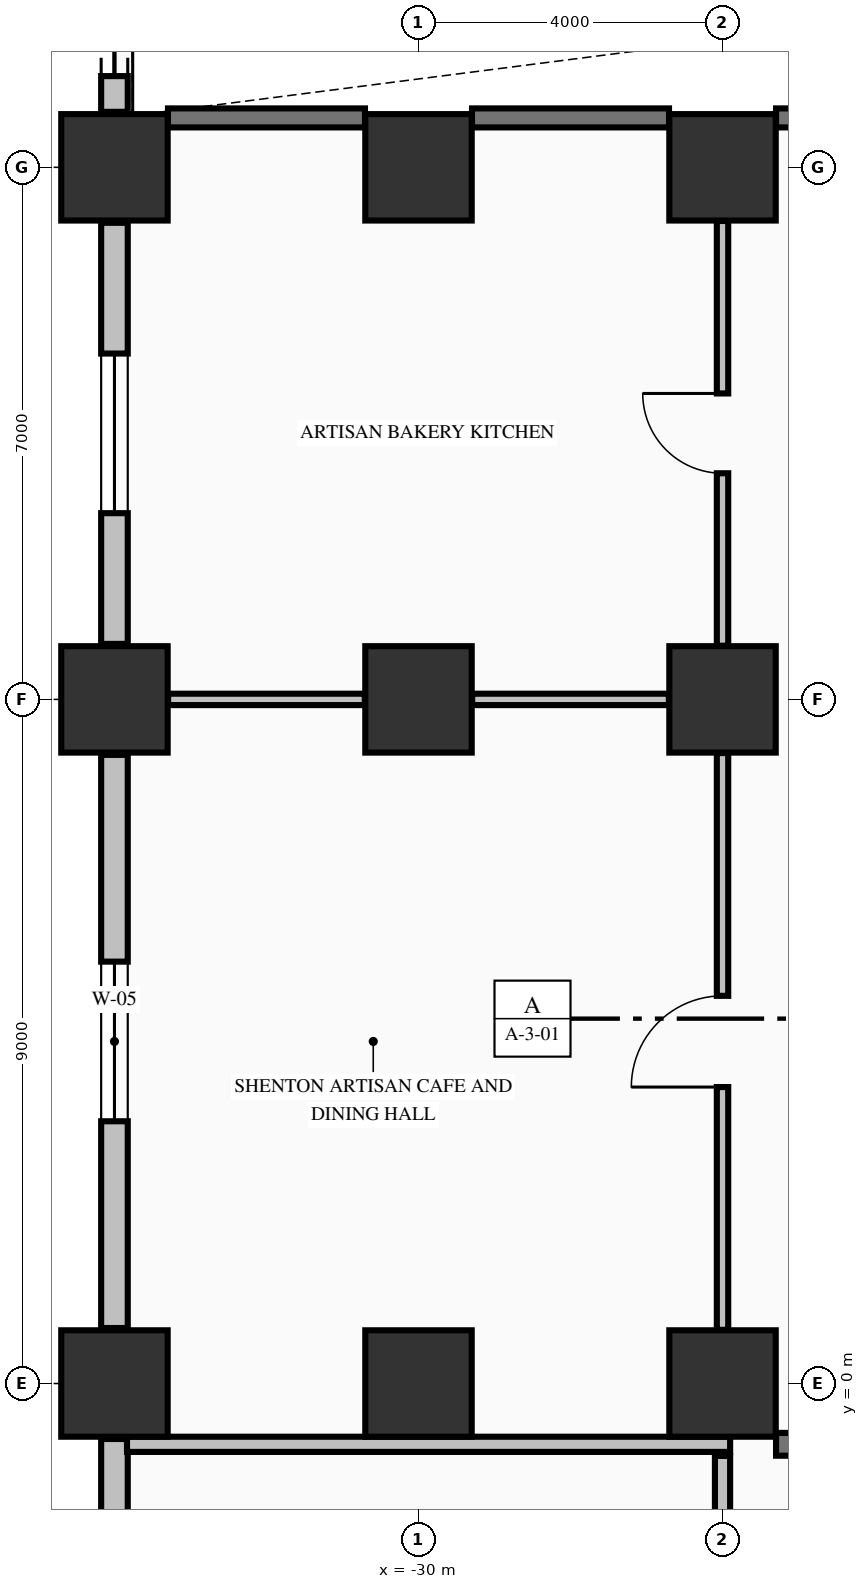
"""IFC4 building model, lengths in metres.
Left out: names, types, materials, properties, quantities, classifications, styles, units other than length and angle.
Written with IfcOpenShell. Run it as: python <this file> out.ifc"""

import sys

from ifc_helpers import new_model, si_unit, direction, frame, frame_2d, origin, origin_2d, place, context, subcontext, project, spatial, rectangle, extrude, element, fill, save


model = new_model("IFC4")
c1 = context("Model", 3, precision=1e-05, world=origin(), true_north=direction((0.0, 1.0)))
c2 = subcontext(c1, "Body", "Model", "MODEL_VIEW")
j1 = project(units=[si_unit("LENGTHUNIT", "METRE"), si_unit("PLANEANGLEUNIT", "RADIAN")], contexts=[c1])
p1 = place(None, origin())
s1 = spatial("IfcSite", under=j1, at=p1, CompositionType="ELEMENT")
p2 = place(p1, origin())
s2 = spatial("IfcBuilding", under=s1, at=p2, CompositionType="ELEMENT")
p3 = place(p2, origin())
s3 = spatial("IfcBuildingStorey", under=s2, at=p3, CompositionType="ELEMENT", Elevation=0.0)
for number, where, z_axis, x_axis in (
    (1, (-34.0, 0.0, 0.0), (0.0, 0.0, 1.0), (1.0, 0.0, 0.0)),
    (2, (-34.0, 9.0, 0.0), (0.0, 0.0, 1.0), (1.0, 0.0, 0.0)),
    (3, (-34.0, 16.0, 0.0), (0.0, 0.0, 1.0), (1.0, 0.0, 0.0)),
    (4, (-30.0, 0.0, 0.0), (0.0, 0.0, 1.0), (1.0, 0.0, 0.0)),
    (5, (-30.0, 9.0, 0.0), (0.0, 0.0, 1.0), (1.0, 0.0, 0.0)),
    (6, (-30.0, 16.0, 0.0), (0.0, 0.0, 1.0), (1.0, 0.0, 0.0)),
    (7, (-26.0, 0.0, 0.0), (0.0, 0.0, 1.0), (1.0, 0.0, 0.0)),
    (8, (-26.0, 9.0, 0.0), (0.0, 0.0, 1.0), (1.0, 0.0, 0.0)),
    (9, (-26.0, 16.0, 0.0), (0.0, 0.0, 1.0), (1.0, 0.0, 0.0)),
):
    element("IfcColumn", number, at=place(p3, frame(where, z_axis=z_axis, x_axis=x_axis)), inside=s3, PredefinedType="COLUMN", context=c2, shape_type="SweptSolid", body=[
        extrude(rectangle(XDim=1.4, YDim=1.4, at=origin_2d()), origin(), (0.0, 0.0, 1.0), 5.09),
    ])
p4 = place(p3, frame((-34.0, -8.27, 0.0), z_axis=(0.0, 0.0, 1.0), x_axis=(0.0, 1.0, 0.0)))
e10 = element("IfcWall", 10, at=p4, inside=s3, PredefinedType="STANDARD", context=c2, shape_type="SweptSolid", body=[
    extrude(rectangle(XDim=7.54, YDim=0.35, at=frame_2d((3.77, 0.0))), origin(), (0.0, 0.0, 1.0), 4.482),
])
p5 = place(p4, frame((2.72, 0.0, 0.75)))
e11 = element("IfcOpeningElement", 11, at=p5, cuts=e10, PredefinedType="OPENING", context=c2, shape_type="SweptSolid", body=[
    extrude(rectangle(XDim=2.1, YDim=1.75, at=frame_2d((1.05, 0.875))), frame((0.0, 0.185, 0.0), z_axis=(0.0, -1.0, 0.0), x_axis=(1.0, 0.0, 0.0)), (0.0, 0.0, 1.0), 0.37),
])
p6 = place(p3, frame((-34.0, 0.73, 0.0), z_axis=(0.0, 0.0, 1.0), x_axis=(0.0, 1.0, 0.0)))
e12 = element("IfcWall", 12, at=p6, inside=s3, PredefinedType="STANDARD", context=c2, shape_type="SweptSolid", body=[
    extrude(rectangle(XDim=7.54, YDim=0.35, at=frame_2d((3.77, 0.0))), origin(), (0.0, 0.0, 1.0), 4.482),
])
p7 = place(p6, frame((2.72, 0.0, 0.75)))
e13 = element("IfcOpeningElement", 13, at=p7, cuts=e12, PredefinedType="OPENING", context=c2, shape_type="SweptSolid", body=[
    extrude(rectangle(XDim=2.1, YDim=1.75, at=frame_2d((1.05, 0.875))), frame((0.0, 0.185, 0.0), z_axis=(0.0, -1.0, 0.0), x_axis=(1.0, 0.0, 0.0)), (0.0, 0.0, 1.0), 0.37),
])
p8 = place(p3, frame((-34.0, 9.73, 0.0), z_axis=(0.0, 0.0, 1.0), x_axis=(0.0, 1.0, 0.0)))
e14 = element("IfcWall", 14, at=p8, inside=s3, PredefinedType="STANDARD", context=c2, shape_type="SweptSolid", body=[
    extrude(rectangle(XDim=5.54, YDim=0.35, at=frame_2d((2.77, 0.0))), origin(), (0.0, 0.0, 1.0), 4.482),
])
p9 = place(p8, frame((1.72, 0.0, 0.75)))
e15 = element("IfcOpeningElement", 15, at=p9, cuts=e14, PredefinedType="OPENING", context=c2, shape_type="SweptSolid", body=[
    extrude(rectangle(XDim=2.1, YDim=1.75, at=frame_2d((1.05, 0.875))), frame((0.0, 0.185, 0.0), z_axis=(0.0, -1.0, 0.0), x_axis=(1.0, 0.0, 0.0)), (0.0, 0.0, 1.0), 0.37),
])
p10 = place(p3, frame((-34.0, 16.73, 0.0), z_axis=(0.0, 0.0, 1.0), x_axis=(0.0, 1.0, 0.0)))
e16 = element("IfcWall", 16, at=p10, inside=s3, PredefinedType="STANDARD", context=c2, shape_type="SweptSolid", body=[
    extrude(rectangle(XDim=4.54, YDim=0.35, at=frame_2d((2.27, 0.0))), origin(), (0.0, 0.0, 1.0), 4.482),
])
p11 = place(p10, frame((0.47, 0.0, 0.0)))
e17 = element("IfcOpeningElement", 17, at=p11, cuts=e16, PredefinedType="OPENING", context=c2, shape_type="SweptSolid", body=[
    extrude(rectangle(XDim=3.6, YDim=3.2, at=frame_2d((1.8, 1.6))), frame((0.0, 0.185, 0.0), z_axis=(0.0, -1.0, 0.0), x_axis=(1.0, 0.0, 0.0)), (0.0, 0.0, 1.0), 0.37),
])
p12 = place(p3, frame((-25.296, -0.8, 0.0), z_axis=(0.0, 0.0, 1.0), x_axis=(1.0, 0.0, 0.0)))
e18 = element("IfcWall", 18, at=p12, inside=s3, PredefinedType="SHEAR", context=c2, shape_type="SweptSolid", body=[
    extrude(rectangle(XDim=3.046, YDim=0.3, at=frame_2d((1.523, 0.0))), origin(), (0.0, 0.0, 1.0), 5.09),
])
for number, where, z_axis, x_axis in (
    (19, (-33.296, 16.65, 0.0), (0.0, 0.0, 1.0), (1.0, 0.0, 0.0)),
    (20, (-29.296, 16.65, 0.0), (0.0, 0.0, 1.0), (1.0, 0.0, 0.0)),
):
    element("IfcWall", number, at=place(p3, frame(where, z_axis=z_axis, x_axis=x_axis)), inside=s3, PredefinedType="SOLIDWALL", context=c2, shape_type="SweptSolid", body=[
        extrude(rectangle(XDim=2.592, YDim=0.25, at=frame_2d((1.296, 0.0))), origin(), (0.0, 0.0, 1.0), 5.09),
    ])
p13 = place(p3, frame((-25.296, 16.65, 0.0), z_axis=(0.0, 0.0, 1.0), x_axis=(1.0, 0.0, 0.0)))
e21 = element("IfcWall", 21, at=p13, inside=s3, PredefinedType="SOLIDWALL", context=c2, shape_type="SweptSolid", body=[
    extrude(rectangle(XDim=4.492, YDim=0.25, at=frame_2d((2.246, 0.0))), origin(), (0.0, 0.0, 1.0), 5.09),
])
p14 = place(p3, frame((-33.835, -0.8, 0.0), z_axis=(0.0, 0.0, 1.0), x_axis=(1.0, 0.0, 0.0)))
e22 = element("IfcWall", 22, at=p14, inside=s3, PredefinedType="PARTITIONING", context=c2, shape_type="SweptSolid", body=[
    extrude(rectangle(XDim=7.935, YDim=0.2, at=frame_2d((3.968, 0.0))), origin(), (0.0, 0.0, 1.0), 5.09),
])
for number, where, z_axis, x_axis in (
    (23, (-33.294, 9.0, 0.0), (0.0, 0.0, 1.0), (1.0, 0.0, 0.0)),
    (24, (-29.294, 9.0, 0.0), (0.0, 0.0, 1.0), (1.0, 0.0, 0.0)),
):
    element("IfcWall", number, at=place(p3, frame(where, z_axis=z_axis, x_axis=x_axis)), inside=s3, PredefinedType="PARTITIONING", context=c2, shape_type="SweptSolid", body=[
        extrude(rectangle(XDim=2.588, YDim=0.15, at=frame_2d((1.294, 0.0))), origin(), (0.0, 0.0, 1.0), 4.132),
    ])
p15 = place(p3, frame((-26.0, -8.294, 0.0), z_axis=(0.0, 0.0, 1.0), x_axis=(0.0, 1.0, 0.0)))
e25 = element("IfcWall", 25, at=p15, inside=s3, PredefinedType="PARTITIONING", context=c2, shape_type="SweptSolid", body=[
    extrude(rectangle(XDim=7.341, YDim=0.2, at=frame_2d((3.67, 0.0))), origin(), (0.0, 0.0, 1.0), 4.132),
])
p16 = place(p3, frame((-26.0, 0.706, 0.0), z_axis=(0.0, 0.0, 1.0), x_axis=(0.0, 1.0, 0.0)))
e26 = element("IfcWall", 26, at=p16, inside=s3, PredefinedType="PARTITIONING", context=c2, shape_type="SweptSolid", body=[
    extrude(rectangle(XDim=7.588, YDim=0.15, at=frame_2d((3.794, 0.0))), origin(), (0.0, 0.0, 1.0), 4.132),
])
p17 = place(p16, frame((3.194, 0.0, 0.0)))
e27 = element("IfcOpeningElement", 27, at=p17, cuts=e26, PredefinedType="OPENING", context=c2, shape_type="SweptSolid", body=[
    extrude(rectangle(XDim=1.2, YDim=2.15, at=frame_2d((0.6, 1.075))), frame((0.0, 0.085, 0.0), z_axis=(0.0, -1.0, 0.0), x_axis=(1.0, 0.0, 0.0)), (0.0, 0.0, 1.0), 0.17),
])
p18 = place(p3, frame((-26.0, 9.706, 0.0), z_axis=(0.0, 0.0, 1.0), x_axis=(0.0, 1.0, 0.0)))
e28 = element("IfcWall", 28, at=p18, inside=s3, PredefinedType="PARTITIONING", context=c2, shape_type="SweptSolid", body=[
    extrude(rectangle(XDim=5.588, YDim=0.15, at=frame_2d((2.794, 0.0))), origin(), (0.0, 0.0, 1.0), 4.132),
])
p19 = place(p18, frame((2.269, 0.0, 0.0)))
e29 = element("IfcOpeningElement", 29, at=p19, cuts=e28, PredefinedType="OPENING", context=c2, shape_type="SweptSolid", body=[
    extrude(rectangle(XDim=1.05, YDim=2.15, at=frame_2d((0.525, 1.075))), frame((0.0, 0.085, 0.0), z_axis=(0.0, -1.0, 0.0), x_axis=(1.0, 0.0, 0.0)), (0.0, 0.0, 1.0), 0.17),
])
p20 = place(p7, origin())
e30 = element("IfcWindow", 30, at=p20, inside=s3, PartitioningType="SINGLE_PANEL", PredefinedType="WINDOW", context=c2, shape_type="SweptSolid", body=[
    extrude(rectangle(XDim=2.1, YDim=1.75, at=frame_2d((1.05, 0.875))), frame((0.0, 0.03, 0.0), z_axis=(0.0, -1.0, 0.0), x_axis=(1.0, 0.0, 0.0)), (0.0, 0.0, 1.0), 0.06),
])
fill(e13, e30)
p21 = place(p9, origin())
e31 = element("IfcWindow", 31, at=p21, inside=s3, PartitioningType="SINGLE_PANEL", PredefinedType="WINDOW", context=c2, shape_type="SweptSolid", body=[
    extrude(rectangle(XDim=2.1, YDim=1.75, at=frame_2d((1.05, 0.875))), frame((0.0, 0.03, 0.0), z_axis=(0.0, -1.0, 0.0), x_axis=(1.0, 0.0, 0.0)), (0.0, 0.0, 1.0), 0.06),
])
fill(e15, e31)
p22 = place(p11, origin())
e32 = element("IfcDoor", 32, at=p22, inside=s3, OperationType="ROLLINGUP", PredefinedType="DOOR", context=c2, shape_type="SweptSolid", body=[
    extrude(rectangle(XDim=3.6, YDim=3.2, at=frame_2d((1.8, 1.6))), frame((0.0, 0.025, 0.0), z_axis=(0.0, -1.0, 0.0), x_axis=(1.0, 0.0, 0.0)), (0.0, 0.0, 1.0), 0.05),
])
fill(e17, e32)
p23 = place(p17, origin())
e33 = element("IfcDoor", 33, at=p23, inside=s3, OperationType="SINGLE_SWING_LEFT", PredefinedType="DOOR", context=c2, shape_type="SweptSolid", body=[
    extrude(rectangle(XDim=1.2, YDim=2.15, at=frame_2d((0.6, 1.075))), frame((0.0, 0.025, 0.0), z_axis=(0.0, -1.0, 0.0), x_axis=(1.0, 0.0, 0.0)), (0.0, 0.0, 1.0), 0.05),
])
fill(e27, e33)
p24 = place(p19, origin())
e34 = element("IfcDoor", 34, at=p24, inside=s3, OperationType="SINGLE_SWING_RIGHT", PredefinedType="DOOR", context=c2, shape_type="SweptSolid", body=[
    extrude(rectangle(XDim=1.05, YDim=2.15, at=frame_2d((0.525, 1.075))), frame((0.0, 0.025, 0.0), z_axis=(0.0, -1.0, 0.0), x_axis=(1.0, 0.0, 0.0)), (0.0, 0.0, 1.0), 0.05),
])
fill(e29, e34)
save(model, sys.argv[1])
